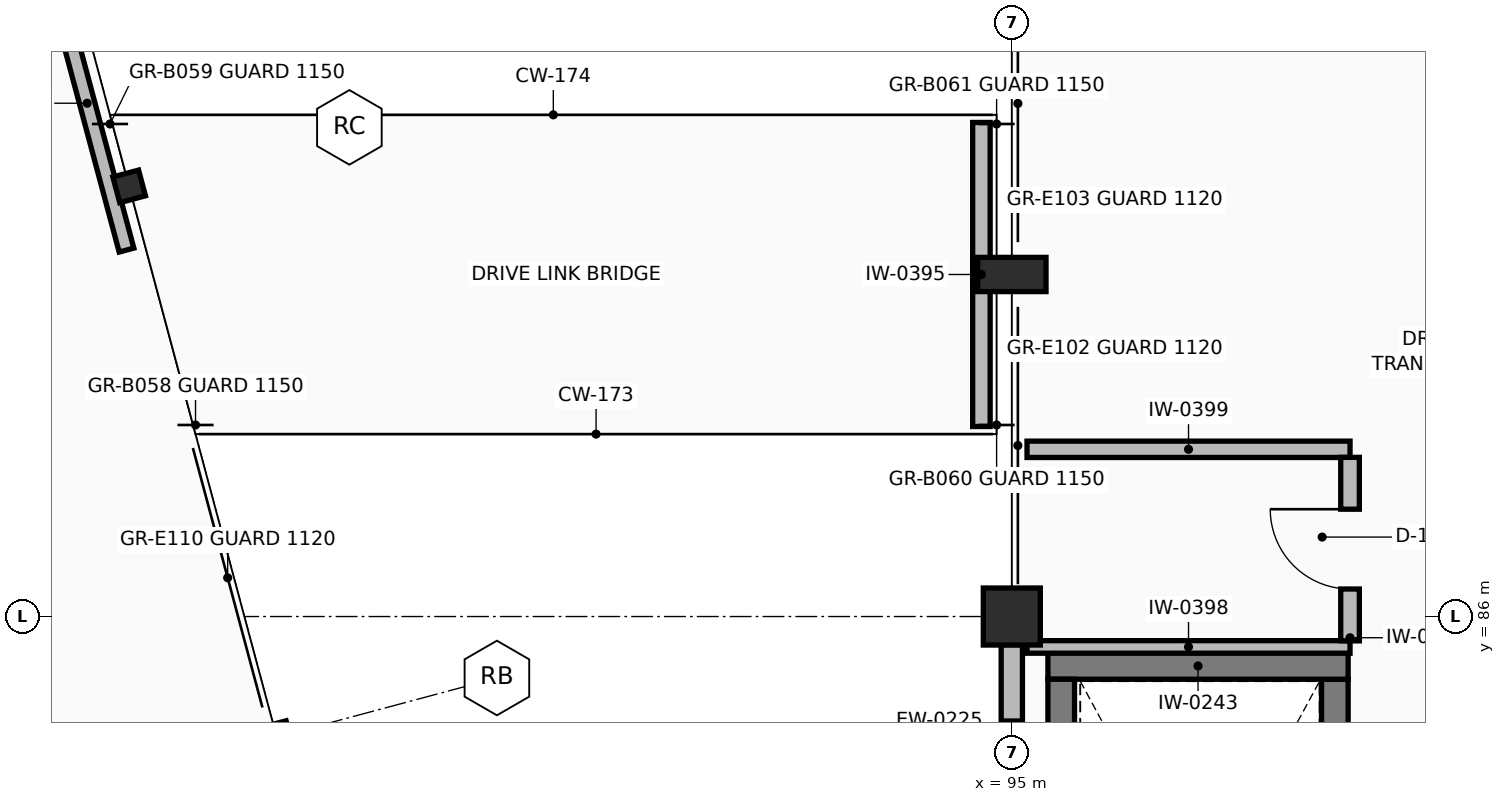
"""IFC4 building model, lengths in metres.
Left out: names, types, materials, properties, quantities, classifications, styles, units other than length and angle.
Written with IfcOpenShell. Run it as: python <this file> out.ifc"""

import sys

from ifc_helpers import new_model, si_unit, direction, frame, frame_2d, origin, origin_2d, place, context, subcontext, project, spatial, rectangle, hollow_rectangle, extrude, element, fill, save


model = new_model("IFC4")
c1 = context("Model", 3, precision=1e-05, world=origin(), true_north=direction((0.0, 1.0)))
c2 = subcontext(c1, "Body", "Model", "MODEL_VIEW")
j1 = project(units=[si_unit("LENGTHUNIT", "METRE"), si_unit("PLANEANGLEUNIT", "RADIAN")], contexts=[c1])
p1 = place(None, origin())
s1 = spatial("IfcSite", under=j1, at=p1, CompositionType="ELEMENT")
p2 = place(p1, origin())
s2 = spatial("IfcBuilding", under=s1, at=p2, CompositionType="ELEMENT")
p3 = place(p2, frame((0.0, 0.0, 9.6)))
s3 = spatial("IfcBuildingStorey", under=s2, at=p3, CompositionType="ELEMENT", Elevation=9.6)
p4 = place(p3, frame((95.0, 86.0, 0.0), z_axis=(0.0, 0.0, 1.0), x_axis=(1.0, 0.0, 0.0)))
e1 = element("IfcColumn", 1, at=p4, inside=s3, PredefinedType="COLUMN", context=c2, shape_type="SweptSolid", body=[
    extrude(rectangle(XDim=0.75, YDim=0.75, at=origin_2d()), origin(), (0.0, 0.0, 1.0), 4.8),
])
p5 = place(p3, frame((95.0, 90.5, 0.0), z_axis=(0.0, 0.0, 1.0), x_axis=(0.0, 1.0, 0.0)))
e2 = element("IfcColumn", 2, at=p5, inside=s3, PredefinedType="PILASTER", context=c2, shape_type="SweptSolid", body=[
    extrude(rectangle(XDim=0.45, YDim=0.9, at=origin_2d()), origin(), (0.0, 0.0, 1.0), 4.8),
])
for number, where, z_axis, x_axis in (
    (3, (85.328, 84.414, 0.0), (0.0, 0.0, 1.0), (0.966, 0.259, 0.0)),
    (4, (83.387, 91.659, 0.0), (0.0, 0.0, 1.0), (0.966, 0.259, 0.0)),
):
    element("IfcColumn", number, at=place(p3, frame(where, z_axis=z_axis, x_axis=x_axis)), inside=s3, PredefinedType="COLUMN", context=c2, shape_type="SweptSolid", body=[
        extrude(hollow_rectangle(XDim=0.35, YDim=0.35, WallThickness=0.016, at=origin_2d()), origin(), (0.0, 0.0, 1.0), 4.8),
    ])
p6 = place(p3, frame((95.0, 85.63, 0.0), z_axis=(0.0, 0.0, 1.0), x_axis=(0.0, -1.0, 0.0)))
e5 = element("IfcWall", 5, at=p6, inside=s3, PredefinedType="SOLIDWALL", context=c2, shape_type="SweptSolid", body=[
    extrude(rectangle(XDim=3.91, YDim=0.28, at=frame_2d((1.955, 0.0))), origin(), (0.0, 0.0, 1.0), 2.752),
])
p7 = place(p6, frame((1.005, 0.0, 0.9)))
e6 = element("IfcOpeningElement", 6, at=p7, cuts=e5, PredefinedType="OPENING", context=c2, shape_type="SweptSolid", body=[
    extrude(rectangle(XDim=1.9, YDim=1.55, at=frame_2d((0.95, 0.775))), frame((0.0, 0.15, 0.0), z_axis=(0.0, -1.0, 0.0), x_axis=(1.0, 0.0, 0.0)), (0.0, 0.0, 1.0), 0.3),
])
p8 = place(p3, frame((99.25, 77.725, 0.0), z_axis=(0.0, 0.0, 1.0), x_axis=(0.0, 1.0, 0.0)))
e7 = element("IfcWall", 7, at=p8, inside=s3, PredefinedType="SHEAR", context=c2, shape_type="SweptSolid", body=[
    extrude(rectangle(XDim=7.45, YDim=0.35, at=frame_2d((3.725, 0.0))), origin(), (0.0, 0.0, 1.0), 4.49),
])
p9 = place(p8, frame((0.35, 0.0, 0.0)))
e8 = element("IfcOpeningElement", 8, at=p9, cuts=e7, PredefinedType="OPENING", context=c2, shape_type="SweptSolid", body=[
    extrude(rectangle(XDim=1.1, YDim=2.2, at=frame_2d((0.55, 1.1))), frame((0.0, 0.185, 0.0), z_axis=(0.0, -1.0, 0.0), x_axis=(1.0, 0.0, 0.0)), (0.0, 0.0, 1.0), 0.37),
])
p10 = place(p3, frame((99.425, 85.35, 0.0), z_axis=(0.0, 0.0, 1.0), x_axis=(-1.0, 0.0, 0.0)))
e9 = element("IfcWall", 9, at=p10, inside=s3, PredefinedType="SHEAR", context=c2, shape_type="SweptSolid", body=[
    extrude(rectangle(XDim=3.95, YDim=0.35, at=frame_2d((1.975, 0.0))), origin(), (0.0, 0.0, 1.0), 4.49),
])
p11 = place(p3, frame((95.65, 85.175, 0.0), z_axis=(0.0, 0.0, 1.0), x_axis=(0.0, -1.0, 0.0)))
e10 = element("IfcWall", 10, at=p11, inside=s3, PredefinedType="SHEAR", context=c2, shape_type="SweptSolid", body=[
    extrude(rectangle(XDim=7.45, YDim=0.35, at=frame_2d((3.725, 0.0))), origin(), (0.0, 0.0, 1.0), 4.49),
])
p12 = place(p3, frame((83.352, 90.821, 0.0), z_axis=(0.0, 0.0, 1.0), x_axis=(-0.258771675905, 0.965938517582, 0.0)))
e11 = element("IfcWall", 11, at=p12, inside=s3, PredefinedType="PARTITIONING", context=c2, shape_type="SweptSolid", body=[
    extrude(rectangle(XDim=4.0, YDim=0.2, at=frame_2d((2.0, 0.0))), origin(), (0.0, 0.0, 1.0), 4.435),
])
p13 = place(p3, frame((94.6, 88.5, 0.0), z_axis=(0.0, 0.0, 1.0), x_axis=(0.0, 1.0, 0.0)))
e12 = element("IfcWall", 12, at=p13, inside=s3, PredefinedType="PARTITIONING", context=c2, shape_type="SweptSolid", body=[
    extrude(rectangle(XDim=4.0, YDim=0.23, at=frame_2d((2.0, 0.0))), origin(), (0.0, 0.0, 1.0), 2.742),
])
p14 = place(p3, frame((95.2, 85.6, 0.0), z_axis=(0.0, 0.0, 1.0), x_axis=(1.0, 0.0, 0.0)))
e13 = element("IfcWall", 13, at=p14, inside=s3, PredefinedType="PARTITIONING", context=c2, shape_type="SweptSolid", body=[
    extrude(rectangle(XDim=4.25, YDim=0.165, at=frame_2d((2.125, 0.0))), origin(), (0.0, 0.0, 1.0), 3.315),
])
p15 = place(p3, frame((95.2, 88.2, 0.0), z_axis=(0.0, 0.0, 1.0), x_axis=(1.0, 0.0, 0.0)))
e14 = element("IfcWall", 14, at=p15, inside=s3, PredefinedType="PARTITIONING", context=c2, shape_type="SweptSolid", body=[
    extrude(rectangle(XDim=4.25, YDim=0.215, at=frame_2d((2.125, 0.0))), origin(), (0.0, 0.0, 1.0), 3.565),
])
p16 = place(p3, frame((99.45, 85.68, 0.0), z_axis=(0.0, 0.0, 1.0), x_axis=(0.0, 1.0, 0.0)))
e15 = element("IfcWall", 15, at=p16, inside=s3, PredefinedType="PARTITIONING", context=c2, shape_type="SweptSolid", body=[
    extrude(rectangle(XDim=2.414, YDim=0.245, at=frame_2d((1.207, 0.0))), origin(), (0.0, 0.0, 1.0), 3.315),
])
p17 = place(p16, frame((0.682, 0.0, 0.0)))
e16 = element("IfcOpeningElement", 16, at=p17, cuts=e15, PredefinedType="OPENING", context=c2, shape_type="SweptSolid", body=[
    extrude(rectangle(XDim=1.05, YDim=2.15, at=frame_2d((0.525, 1.075))), frame((0.0, 0.133, 0.0), z_axis=(0.0, -1.0, 0.0), x_axis=(1.0, 0.0, 0.0)), (0.0, 0.0, 1.0), 0.265),
])
p18 = place(p7, origin())
e17 = element("IfcWindow", 17, at=p18, inside=s3, PartitioningType="SINGLE_PANEL", PredefinedType="WINDOW", context=c2, shape_type="SweptSolid", body=[
    extrude(rectangle(XDim=1.9, YDim=1.55, at=frame_2d((0.95, 0.775))), frame((0.0, 0.03, 0.0), z_axis=(0.0, -1.0, 0.0), x_axis=(1.0, 0.0, 0.0)), (0.0, 0.0, 1.0), 0.06),
])
fill(e6, e17)
p19 = place(p17, origin())
e18 = element("IfcDoor", 18, at=p19, inside=s3, OperationType="SINGLE_SWING_RIGHT", PredefinedType="DOOR", context=c2, shape_type="SweptSolid", body=[
    extrude(rectangle(XDim=1.05, YDim=2.15, at=frame_2d((0.525, 1.075))), frame((0.0, 0.025, 0.0), z_axis=(0.0, -1.0, 0.0), x_axis=(1.0, 0.0, 0.0)), (0.0, 0.0, 1.0), 0.05),
])
fill(e16, e18)
save(model, sys.argv[1])
